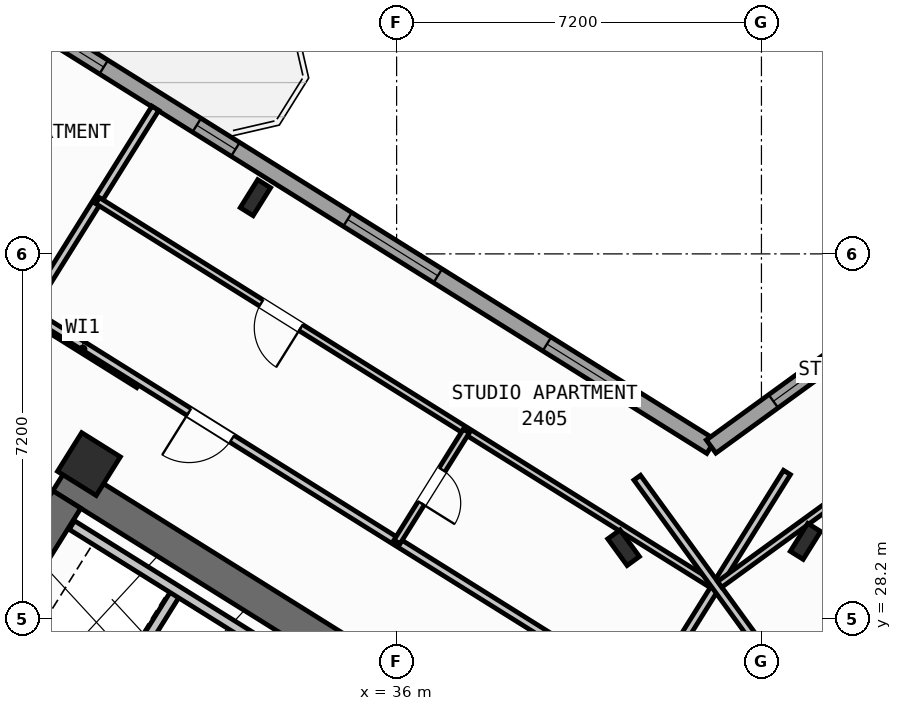
"""IFC4 building model, lengths in metres.
Left out: names, types, materials, properties, quantities, classifications, styles, units other than length and angle.
Written with IfcOpenShell. Run it as: python <this file> out.ifc"""

import sys

from ifc_helpers import new_model, si_unit, direction, frame, frame_2d, origin, origin_2d, place, context, subcontext, project, spatial, rectangle, hollow_rectangle, i_section, extrude, source, transform, mapped, element, fill, save


model = new_model("IFC4")
c1 = context("Model", 3, precision=1e-05, world=origin(), true_north=direction((0.0, 1.0)))
c2 = subcontext(c1, "Body", "Model", "MODEL_VIEW")
j1 = project(units=[si_unit("LENGTHUNIT", "METRE"), si_unit("PLANEANGLEUNIT", "RADIAN")], contexts=[c1])
p1 = place(None, origin())
s1 = spatial("IfcSite", under=j1, at=p1, CompositionType="ELEMENT")
p2 = place(p1, origin())
s2 = spatial("IfcBuilding", under=s1, at=p2, CompositionType="ELEMENT")
p3 = place(p2, frame((0.0, 0.0, 97.2)))
s3 = spatial("IfcBuildingStorey", under=s2, at=p3, CompositionType="ELEMENT", Elevation=97.2)
p4 = place(p3, frame((40.615, 23.983, 0.0), z_axis=(0.0, 0.0, 1.0), x_axis=(-0.848045953968, 0.529922692436, 0.0)))
e1 = element("IfcWall", 1, at=p4, inside=s3, PredefinedType="SHEAR", context=c2, shape_type="SweptSolid", body=[
    extrude(rectangle(XDim=13.24, YDim=0.65, at=frame_2d((6.62, 0.0))), origin(), (0.0, 0.0, 1.0), 3.32),
])
p5 = place(p3, frame((29.491, 30.552, 0.0), z_axis=(0.0, 0.0, 1.0), x_axis=(-0.529893103397, -0.8480644427, 0.0)))
e2 = element("IfcWall", 2, at=p5, inside=s3, PredefinedType="SHEAR", context=c2, shape_type="SweptSolid", body=[
    extrude(rectangle(XDim=3.525, YDim=0.65, at=frame_2d((1.763, 0.0))), origin(), (0.0, 0.0, 1.0), 3.32),
])
p6 = place(p3, frame((44.325, 24.113, 0.0), z_axis=(0.0, 0.0, 1.0), x_axis=(0.809012664862, 0.58779121131, 0.0)))
e3 = element("IfcWall", 3, at=p6, inside=s3, PredefinedType="SHEAR", context=c2, shape_type="SweptSolid", body=[
    extrude(rectangle(XDim=12.44, YDim=0.65, at=frame_2d((6.22, 0.0))), origin(), (0.0, 0.0, 1.0), 3.32),
])
m1 = source(origin(), c2, "Body", "SweptSolid", [
    extrude(i_section(OverallWidth=0.3, OverallDepth=0.65, WebThickness=0.016, FlangeThickness=0.031, at=origin_2d()), origin(), (0.0, 0.0, 1.0), 3.6),
])
for number, where, z_axis, x_axis in (
    (4, (44.068, 29.726, 0.0), (0.0, 0.0, 1.0), (-0.848, 0.53, 0.0)),
    (5, (33.213, 36.509, 0.0), (0.0, 0.0, 1.0), (-0.848, 0.53, 0.0)),
):
    element("IfcColumn", number, at=place(p3, frame(where, z_axis=z_axis, x_axis=x_axis)), inside=s3, PredefinedType="COLUMN", context=c2, shape_type="MappedRepresentation", body=[
        mapped(m1, transform((0.0, 0.0, 0.0), scale=1.0)),
    ])
m2 = source(origin(), c2, "Body", "SweptSolid", [
    extrude(hollow_rectangle(XDim=0.9, YDim=0.9, WallThickness=0.036, at=origin_2d()), origin(), (0.0, 0.0, 1.0), 3.6),
])
p7 = place(p3, frame((29.928, 31.251, 0.0), z_axis=(0.0, 0.0, 1.0), x_axis=(-0.848048096156, 0.529919264233, 0.0)))
e6 = element("IfcColumn", 6, at=p7, inside=s3, PredefinedType="COLUMN", context=c2, shape_type="MappedRepresentation", body=[
    mapped(m2, transform((0.0, 0.0, 0.0), scale=1.0)),
])
p8 = place(p3, frame((40.479, 29.601, 0.0), z_axis=(0.0, 0.0, 1.0), x_axis=(0.809016994375, 0.587785252292, 0.0)))
e7 = element("IfcColumn", 7, at=p8, inside=s3, PredefinedType="COLUMN", context=c2, shape_type="MappedRepresentation", body=[
    mapped(m1, transform((0.0, 0.0, 0.0), scale=1.0)),
])
p9 = place(p3, frame((31.76, 12.183, 0.0), z_axis=(0.0, 0.0, 1.0), x_axis=(-0.848047074256, 0.529920899612, 0.0)))
e8 = element("IfcWall", 8, at=p9, inside=s3, PredefinedType="STANDARD", context=c2, shape_type="SweptSolid", body=[
    extrude(rectangle(XDim=30.652, YDim=0.32, at=frame_2d((15.326, 0.0))), origin(), (0.0, 0.0, 1.0), 3.32),
])
p10 = place(p9, frame((15.153, 0.0, 0.0)))
e9 = element("IfcOpeningElement", 9, at=p10, cuts=e8, PredefinedType="OPENING", context=c2, shape_type="SweptSolid", body=[
    extrude(rectangle(XDim=1.2, YDim=2.15, at=frame_2d((0.6, 1.075))), frame((0.0, 0.17, 0.0), z_axis=(0.0, -1.0, 0.0), x_axis=(1.0, 0.0, 0.0)), (0.0, 0.0, 1.0), 0.34),
])
p11 = place(p9, frame((2.002, 0.0, 0.8)))
e10 = element("IfcOpeningElement", 10, at=p11, cuts=e8, PredefinedType="OPENING", context=c2, shape_type="SweptSolid", body=[
    extrude(rectangle(XDim=2.1, YDim=1.55, at=frame_2d((1.05, 0.775))), frame((0.0, 0.17, 0.0), z_axis=(0.0, -1.0, 0.0), x_axis=(1.0, 0.0, 0.0)), (0.0, 0.0, 1.0), 0.34),
])
p12 = place(p9, frame((7.206, 0.0, 0.8)))
e11 = element("IfcOpeningElement", 11, at=p12, cuts=e8, PredefinedType="OPENING", context=c2, shape_type="SweptSolid", body=[
    extrude(rectangle(XDim=2.1, YDim=1.55, at=frame_2d((1.05, 0.775))), frame((0.0, 0.17, 0.0), z_axis=(0.0, -1.0, 0.0), x_axis=(1.0, 0.0, 0.0)), (0.0, 0.0, 1.0), 0.34),
])
p13 = place(p9, frame((12.648, 0.0, 1.0)))
e12 = element("IfcOpeningElement", 12, at=p13, cuts=e8, PredefinedType="OPENING", context=c2, shape_type="SweptSolid", body=[
    extrude(rectangle(XDim=0.9, YDim=1.25, at=frame_2d((0.45, 0.625))), frame((0.0, 0.17, 0.0), z_axis=(0.0, -1.0, 0.0), x_axis=(1.0, 0.0, 0.0)), (0.0, 0.0, 1.0), 0.34),
])
p14 = place(p9, frame((27.974, 0.0, 0.95)))
e13 = element("IfcOpeningElement", 13, at=p14, cuts=e8, PredefinedType="OPENING", context=c2, shape_type="SweptSolid", body=[
    extrude(rectangle(XDim=1.2, YDim=1.4, at=frame_2d((0.6, 0.7))), frame((0.0, 0.17, 0.0), z_axis=(0.0, -1.0, 0.0), x_axis=(1.0, 0.0, 0.0)), (0.0, 0.0, 1.0), 0.34),
])
p15 = place(p9, frame((18.347, 0.0, 1.0)))
e14 = element("IfcOpeningElement", 14, at=p15, cuts=e8, PredefinedType="OPENING", context=c2, shape_type="SweptSolid", body=[
    extrude(rectangle(XDim=0.9, YDim=1.25, at=frame_2d((0.45, 0.625))), frame((0.0, 0.17, 0.0), z_axis=(0.0, -1.0, 0.0), x_axis=(1.0, 0.0, 0.0)), (0.0, 0.0, 1.0), 0.34),
])
p16 = place(p9, frame((20.931, 0.0, 1.0)))
e15 = element("IfcOpeningElement", 15, at=p16, cuts=e8, PredefinedType="OPENING", context=c2, shape_type="SweptSolid", body=[
    extrude(rectangle(XDim=0.65, YDim=1.15, at=frame_2d((0.325, 0.575))), frame((0.0, 0.17, 0.0), z_axis=(0.0, -1.0, 0.0), x_axis=(1.0, 0.0, 0.0)), (0.0, 0.0, 1.0), 0.34),
])
p17 = place(p9, frame((22.938, 0.0, 1.0)))
e16 = element("IfcOpeningElement", 16, at=p17, cuts=e8, PredefinedType="OPENING", context=c2, shape_type="SweptSolid", body=[
    extrude(rectangle(XDim=0.9, YDim=1.25, at=frame_2d((0.45, 0.625))), frame((0.0, 0.17, 0.0), z_axis=(0.0, -1.0, 0.0), x_axis=(1.0, 0.0, 0.0)), (0.0, 0.0, 1.0), 0.34),
])
p18 = place(p9, frame((25.069, 0.0, 1.0)))
e17 = element("IfcOpeningElement", 17, at=p18, cuts=e8, PredefinedType="OPENING", context=c2, shape_type="SweptSolid", body=[
    extrude(rectangle(XDim=0.9, YDim=1.25, at=frame_2d((0.45, 0.625))), frame((0.0, 0.17, 0.0), z_axis=(0.0, -1.0, 0.0), x_axis=(1.0, 0.0, 0.0)), (0.0, 0.0, 1.0), 0.34),
])
p19 = place(p3, frame((17.424, 47.083, 0.0), z_axis=(0.0, 0.0, 1.0), x_axis=(0.848049927979, -0.529916332693, 0.0)))
e18 = element("IfcWall", 18, at=p19, inside=s3, PredefinedType="STANDARD", context=c2, shape_type="SweptSolid", body=[
    extrude(rectangle(XDim=29.223, YDim=0.32, at=frame_2d((14.612, 0.0))), origin(), (0.0, 0.0, 1.0), 3.32),
])
p20 = place(p19, frame((3.745, 0.0, 0.0)))
e19 = element("IfcOpeningElement", 19, at=p20, cuts=e18, PredefinedType="OPENING", context=c2, shape_type="SweptSolid", body=[
    extrude(rectangle(XDim=1.05, YDim=2.15, at=frame_2d((0.525, 1.075))), frame((0.0, 0.17, 0.0), z_axis=(0.0, -1.0, 0.0), x_axis=(1.0, 0.0, 0.0)), (0.0, 0.0, 1.0), 0.34),
])
p21 = place(p19, frame((0.699, 0.0, 0.95)))
e20 = element("IfcOpeningElement", 20, at=p21, cuts=e18, PredefinedType="OPENING", context=c2, shape_type="SweptSolid", body=[
    extrude(rectangle(XDim=1.2, YDim=1.4, at=frame_2d((0.6, 0.7))), frame((0.0, 0.17, 0.0), z_axis=(0.0, -1.0, 0.0), x_axis=(1.0, 0.0, 0.0)), (0.0, 0.0, 1.0), 0.34),
])
p22 = place(p19, frame((6.951, 0.0, 1.0)))
e21 = element("IfcOpeningElement", 21, at=p22, cuts=e18, PredefinedType="OPENING", context=c2, shape_type="SweptSolid", body=[
    extrude(rectangle(XDim=0.9, YDim=1.25, at=frame_2d((0.45, 0.625))), frame((0.0, 0.17, 0.0), z_axis=(0.0, -1.0, 0.0), x_axis=(1.0, 0.0, 0.0)), (0.0, 0.0, 1.0), 0.34),
])
p23 = place(p19, frame((9.841, 0.0, 0.85)))
e22 = element("IfcOpeningElement", 22, at=p23, cuts=e18, PredefinedType="OPENING", context=c2, shape_type="SweptSolid", body=[
    extrude(rectangle(XDim=1.5, YDim=1.5, at=frame_2d((0.75, 0.75))), frame((0.0, 0.17, 0.0), z_axis=(0.0, -1.0, 0.0), x_axis=(1.0, 0.0, 0.0)), (0.0, 0.0, 1.0), 0.34),
])
p24 = place(p19, frame((13.889, 0.0, 0.95)))
e23 = element("IfcOpeningElement", 23, at=p24, cuts=e18, PredefinedType="OPENING", context=c2, shape_type="SweptSolid", body=[
    extrude(rectangle(XDim=1.2, YDim=1.4, at=frame_2d((0.6, 0.7))), frame((0.0, 0.17, 0.0), z_axis=(0.0, -1.0, 0.0), x_axis=(1.0, 0.0, 0.0)), (0.0, 0.0, 1.0), 0.34),
])
p25 = place(p19, frame((17.254, 0.0, 1.0)))
e24 = element("IfcOpeningElement", 24, at=p25, cuts=e18, PredefinedType="OPENING", context=c2, shape_type="SweptSolid", body=[
    extrude(rectangle(XDim=0.9, YDim=1.25, at=frame_2d((0.45, 0.625))), frame((0.0, 0.17, 0.0), z_axis=(0.0, -1.0, 0.0), x_axis=(1.0, 0.0, 0.0)), (0.0, 0.0, 1.0), 0.34),
])
p26 = place(p19, frame((20.764, 0.0, 0.8)))
e25 = element("IfcOpeningElement", 25, at=p26, cuts=e18, PredefinedType="OPENING", context=c2, shape_type="SweptSolid", body=[
    extrude(rectangle(XDim=2.1, YDim=1.55, at=frame_2d((1.05, 0.775))), frame((0.0, 0.17, 0.0), z_axis=(0.0, -1.0, 0.0), x_axis=(1.0, 0.0, 0.0)), (0.0, 0.0, 1.0), 0.34),
])
p27 = place(p19, frame((25.403, 0.0, 0.8)))
e26 = element("IfcOpeningElement", 26, at=p27, cuts=e18, PredefinedType="OPENING", context=c2, shape_type="SweptSolid", body=[
    extrude(rectangle(XDim=2.1, YDim=1.55, at=frame_2d((1.05, 0.775))), frame((0.0, 0.17, 0.0), z_axis=(0.0, -1.0, 0.0), x_axis=(1.0, 0.0, 0.0)), (0.0, 0.0, 1.0), 0.34),
])
p28 = place(p3, frame((42.207, 31.597, 0.0), z_axis=(0.0, 0.0, 1.0), x_axis=(0.809020333377, 0.587780656523, 0.0)))
e27 = element("IfcWall", 27, at=p28, inside=s3, PredefinedType="STANDARD", context=c2, shape_type="SweptSolid", body=[
    extrude(rectangle(XDim=15.223, YDim=0.32, at=frame_2d((7.611, 0.0))), origin(), (0.0, 0.0, 1.0), 3.32),
])
p29 = place(p28, frame((12.82, 0.0, 0.0)))
e28 = element("IfcOpeningElement", 28, at=p29, cuts=e27, PredefinedType="OPENING", context=c2, shape_type="SweptSolid", body=[
    extrude(rectangle(XDim=1.05, YDim=2.15, at=frame_2d((0.525, 1.075))), frame((0.0, 0.17, 0.0), z_axis=(0.0, -1.0, 0.0), x_axis=(1.0, 0.0, 0.0)), (0.0, 0.0, 1.0), 0.34),
])
p30 = place(p28, frame((1.52, 0.0, 0.8)))
e29 = element("IfcOpeningElement", 29, at=p30, cuts=e27, PredefinedType="OPENING", context=c2, shape_type="SweptSolid", body=[
    extrude(rectangle(XDim=2.1, YDim=1.55, at=frame_2d((1.05, 0.775))), frame((0.0, 0.17, 0.0), z_axis=(0.0, -1.0, 0.0), x_axis=(1.0, 0.0, 0.0)), (0.0, 0.0, 1.0), 0.34),
])
p31 = place(p28, frame((5.76, 0.0, 0.8)))
e30 = element("IfcOpeningElement", 30, at=p31, cuts=e27, PredefinedType="OPENING", context=c2, shape_type="SweptSolid", body=[
    extrude(rectangle(XDim=2.1, YDim=1.55, at=frame_2d((1.05, 0.775))), frame((0.0, 0.17, 0.0), z_axis=(0.0, -1.0, 0.0), x_axis=(1.0, 0.0, 0.0)), (0.0, 0.0, 1.0), 0.34),
])
p32 = place(p28, frame((10.219, 0.0, 1.0)))
e31 = element("IfcOpeningElement", 31, at=p32, cuts=e27, PredefinedType="OPENING", context=c2, shape_type="SweptSolid", body=[
    extrude(rectangle(XDim=0.9, YDim=1.25, at=frame_2d((0.45, 0.625))), frame((0.0, 0.17, 0.0), z_axis=(0.0, -1.0, 0.0), x_axis=(1.0, 0.0, 0.0)), (0.0, 0.0, 1.0), 0.34),
])
p33 = place(p3, frame((31.645, 28.716, 0.0), z_axis=(0.0, 0.0, 1.0), x_axis=(-0.52986693015, -0.848080795876, 0.0)))
e32 = element("IfcWall", 32, at=p33, inside=s3, PredefinedType="STANDARD", context=c2, shape_type="SweptSolid", body=[
    extrude(rectangle(XDim=2.66, YDim=0.2, at=frame_2d((1.33, 0.0))), origin(), (0.0, 0.0, 1.0), 3.31),
])
p34 = place(p3, frame((33.363, 27.69, 0.0), z_axis=(0.0, 0.0, 1.0), x_axis=(-0.848053806312, 0.529910125964, 0.0)))
e33 = element("IfcWall", 33, at=p34, inside=s3, PredefinedType="STANDARD", context=c2, shape_type="SweptSolid", body=[
    extrude(rectangle(XDim=4.448, YDim=0.2, at=frame_2d((2.224, 0.0))), origin(), (0.0, 0.0, 1.0), 3.31),
])
p35 = place(p3, frame((30.914, 32.829, 0.0), z_axis=(0.0, 0.0, 1.0), x_axis=(-0.848008813643, 0.529982124211, 0.0)))
e34 = element("IfcWall", 34, at=p35, inside=s3, PredefinedType="PARTITIONING", context=c2, shape_type="SweptSolid", body=[
    extrude(rectangle(XDim=2.61, YDim=0.16, at=frame_2d((1.305, 0.0))), origin(), (0.0, 0.0, 1.0), 3.31),
])
p36 = place(p3, frame((31.239, 38.274, 0.0), z_axis=(0.0, 0.0, 1.0), x_axis=(-0.529928058306, -0.848042600947, 0.0)))
e35 = element("IfcWall", 35, at=p36, inside=s3, PredefinedType="PARTITIONING", context=c2, shape_type="SweptSolid", body=[
    extrude(rectangle(XDim=8.05, YDim=0.16, at=frame_2d((4.025, 0.0))), origin(), (0.0, 0.0, 1.0), 3.31),
])
p37 = place(p3, frame((41.936, 26.012, 0.0), z_axis=(0.0, 0.0, 1.0), x_axis=(-0.848051154596, 0.529914369676, 0.0)))
e36 = element("IfcWall", 36, at=p37, inside=s3, PredefinedType="PARTITIONING", context=c2, shape_type="SweptSolid", body=[
    extrude(rectangle(XDim=15.57, YDim=0.16, at=frame_2d((7.785, 0.0))), origin(), (0.0, 0.0, 1.0), 3.31),
])
p38 = place(p37, frame((10.83, 0.0, 0.0)))
e37 = element("IfcOpeningElement", 37, at=p38, cuts=e36, PredefinedType="OPENING", context=c2, shape_type="SweptSolid", body=[
    extrude(rectangle(XDim=1.0, YDim=2.1, at=frame_2d((0.5, 1.05))), frame((0.0, 0.09, 0.0), z_axis=(0.0, -1.0, 0.0), x_axis=(1.0, 0.0, 0.0)), (0.0, 0.0, 1.0), 0.18),
])
p39 = place(p3, frame((43.704, 31.086, 0.0), z_axis=(0.0, 0.0, 1.0), x_axis=(-0.529906828443, -0.848055866774, 0.0)))
e38 = element("IfcWall", 38, at=p39, inside=s3, PredefinedType="PARTITIONING", context=c2, shape_type="SweptSolid", body=[
    extrude(rectangle(XDim=5.48, YDim=0.16, at=frame_2d((2.74, 0.0))), origin(), (0.0, 0.0, 1.0), 3.31),
])
p40 = place(p3, frame((42.226, 28.873, 0.0), z_axis=(0.0, 0.0, 1.0), x_axis=(-0.848049134363, 0.529917602752, 0.0)))
e39 = element("IfcWall", 39, at=p40, inside=s3, PredefinedType="PLUMBINGWALL", context=c2, shape_type="SweptSolid", body=[
    extrude(rectangle(XDim=14.3, YDim=0.14, at=frame_2d((7.15, 0.0))), origin(), (0.0, 0.0, 1.0), 3.31),
])
p41 = place(p40, frame((9.57, 0.0, 0.0)))
e40 = element("IfcOpeningElement", 40, at=p41, cuts=e39, PredefinedType="OPENING", context=c2, shape_type="SweptSolid", body=[
    extrude(rectangle(XDim=0.92, YDim=2.08, at=frame_2d((0.46, 1.04))), frame((0.0, 0.08, 0.0), z_axis=(0.0, -1.0, 0.0), x_axis=(1.0, 0.0, 0.0)), (0.0, 0.0, 1.0), 0.16),
])
p42 = place(p3, frame((37.375, 31.904, 0.0), z_axis=(0.0, 0.0, 1.0), x_axis=(-0.529913878929, -0.848051461244, 0.0)))
e41 = element("IfcWall", 41, at=p42, inside=s3, PredefinedType="PLUMBINGWALL", context=c2, shape_type="SweptSolid", body=[
    extrude(rectangle(XDim=2.58, YDim=0.14, at=frame_2d((1.29, 0.0))), origin(), (0.0, 0.0, 1.0), 3.31),
])
p43 = place(p42, frame((0.9, 0.0, 0.0)))
e42 = element("IfcOpeningElement", 42, at=p43, cuts=e41, PredefinedType="OPENING", context=c2, shape_type="SweptSolid", body=[
    extrude(rectangle(XDim=0.78, YDim=2.05, at=frame_2d((0.39, 1.025))), frame((0.0, 0.08, 0.0), z_axis=(0.0, -1.0, 0.0), x_axis=(1.0, 0.0, 0.0)), (0.0, 0.0, 1.0), 0.16),
])
p44 = place(p3, frame((42.866, 26.044, 0.0), z_axis=(0.0, 0.0, 1.0), x_axis=(0.809020254154, 0.587780765566, 0.0)))
e43 = element("IfcWall", 43, at=p44, inside=s3, PredefinedType="PARTITIONING", context=c2, shape_type="SweptSolid", body=[
    extrude(rectangle(XDim=14.67, YDim=0.16, at=frame_2d((7.335, 0.0))), origin(), (0.0, 0.0, 1.0), 3.31),
])
p45 = place(p44, frame((10.2, 0.0, 0.0)))
e44 = element("IfcOpeningElement", 44, at=p45, cuts=e43, PredefinedType="OPENING", context=c2, shape_type="SweptSolid", body=[
    extrude(rectangle(XDim=1.0, YDim=2.1, at=frame_2d((0.5, 1.05))), frame((0.0, 0.09, 0.0), z_axis=(0.0, -1.0, 0.0), x_axis=(1.0, 0.0, 0.0)), (0.0, 0.0, 1.0), 0.18),
])
p46 = place(p3, frame((43.969, 26.55, 0.0), z_axis=(0.0, 0.0, 1.0), x_axis=(-0.587776919386, 0.80902304852, 0.0)))
e45 = element("IfcWall", 45, at=p46, inside=s3, PredefinedType="PARTITIONING", context=c2, shape_type="SweptSolid", body=[
    extrude(rectangle(XDim=5.48, YDim=0.16, at=frame_2d((2.74, 0.0))), origin(), (0.0, 0.0, 1.0), 3.31),
])
p47 = place(p3, frame((42.377, 28.878, 0.0), z_axis=(0.0, 0.0, 1.0), x_axis=(0.809020411523, 0.587780548963, 0.0)))
e46 = element("IfcWall", 46, at=p47, inside=s3, PredefinedType="PLUMBINGWALL", context=c2, shape_type="SweptSolid", body=[
    extrude(rectangle(XDim=13.4, YDim=0.14, at=frame_2d((6.7, 0.0))), origin(), (0.0, 0.0, 1.0), 3.31),
])
p48 = place(p47, frame((8.94, 0.0, 0.0)))
e47 = element("IfcOpeningElement", 47, at=p48, cuts=e46, PredefinedType="OPENING", context=c2, shape_type="SweptSolid", body=[
    extrude(rectangle(XDim=0.92, YDim=2.08, at=frame_2d((0.46, 1.04))), frame((0.0, 0.08, 0.0), z_axis=(0.0, -1.0, 0.0), x_axis=(1.0, 0.0, 0.0)), (0.0, 0.0, 1.0), 0.16),
])
m3 = source(origin(), c2, "Body", "SweptSolid", [
    extrude(rectangle(XDim=1.2, YDim=1.4, at=frame_2d((0.6, 0.7))), frame((0.0, 0.03, 0.0), z_axis=(0.0, -1.0, 0.0), x_axis=(1.0, 0.0, 0.0)), (0.0, 0.0, 1.0), 0.06),
])
p49 = place(p24, origin())
e48 = element("IfcWindow", 48, at=p49, inside=s3, PartitioningType="SINGLE_PANEL", PredefinedType="WINDOW", context=c2, shape_type="MappedRepresentation", body=[
    mapped(m3, transform((0.0, 0.0, 0.0), scale=1.0)),
])
fill(e23, e48)
m4 = source(origin(), c2, "Body", "SweptSolid", [
    extrude(rectangle(XDim=0.9, YDim=1.25, at=frame_2d((0.45, 0.625))), frame((0.0, 0.03, 0.0), z_axis=(0.0, -1.0, 0.0), x_axis=(1.0, 0.0, 0.0)), (0.0, 0.0, 1.0), 0.06),
])
p50 = place(p25, origin())
e49 = element("IfcWindow", 49, at=p50, inside=s3, PartitioningType="SINGLE_PANEL", PredefinedType="WINDOW", context=c2, shape_type="MappedRepresentation", body=[
    mapped(m4, transform((0.0, 0.0, 0.0), scale=1.0)),
])
fill(e24, e49)
m5 = source(origin(), c2, "Body", "SweptSolid", [
    extrude(rectangle(XDim=2.1, YDim=1.55, at=frame_2d((1.05, 0.775))), frame((0.0, 0.03, 0.0), z_axis=(0.0, -1.0, 0.0), x_axis=(1.0, 0.0, 0.0)), (0.0, 0.0, 1.0), 0.06),
])
p51 = place(p26, origin())
e50 = element("IfcWindow", 50, at=p51, inside=s3, PartitioningType="SINGLE_PANEL", PredefinedType="WINDOW", context=c2, shape_type="MappedRepresentation", body=[
    mapped(m5, transform((0.0, 0.0, 0.0), scale=1.0)),
])
fill(e25, e50)
p52 = place(p27, origin())
e51 = element("IfcWindow", 51, at=p52, inside=s3, PartitioningType="SINGLE_PANEL", PredefinedType="WINDOW", context=c2, shape_type="MappedRepresentation", body=[
    mapped(m5, transform((0.0, 0.0, 0.0), scale=1.0)),
])
fill(e26, e51)
p53 = place(p30, origin())
e52 = element("IfcWindow", 52, at=p53, inside=s3, PartitioningType="SINGLE_PANEL", PredefinedType="WINDOW", context=c2, shape_type="MappedRepresentation", body=[
    mapped(m5, transform((0.0, 0.0, 0.0), scale=1.0)),
])
fill(e29, e52)
m6 = source(origin(), c2, "Body", "SweptSolid", [
    extrude(rectangle(XDim=1.0, YDim=2.1, at=frame_2d((0.5, 1.05))), frame((0.0, 0.025, 0.0), z_axis=(0.0, -1.0, 0.0), x_axis=(1.0, 0.0, 0.0)), (0.0, 0.0, 1.0), 0.05),
])
p54 = place(p38, origin())
e53 = element("IfcDoor", 53, at=p54, inside=s3, OperationType="SINGLE_SWING_RIGHT", PredefinedType="DOOR", context=c2, shape_type="MappedRepresentation", body=[
    mapped(m6, transform((0.0, 0.0, 0.0), scale=1.0)),
])
fill(e37, e53)
m7 = source(origin(), c2, "Body", "SweptSolid", [
    extrude(rectangle(XDim=0.92, YDim=2.08, at=frame_2d((0.46, 1.04))), frame((0.0, 0.025, 0.0), z_axis=(0.0, -1.0, 0.0), x_axis=(1.0, 0.0, 0.0)), (0.0, 0.0, 1.0), 0.05),
])
p55 = place(p41, origin())
e54 = element("IfcDoor", 54, at=p55, inside=s3, OperationType="SINGLE_SWING_LEFT", PredefinedType="DOOR", context=c2, shape_type="MappedRepresentation", body=[
    mapped(m7, transform((0.0, 0.0, 0.0), scale=1.0)),
])
fill(e40, e54)
m8 = source(origin(), c2, "Body", "SweptSolid", [
    extrude(rectangle(XDim=0.78, YDim=2.05, at=frame_2d((0.39, 1.025))), frame((0.0, 0.025, 0.0), z_axis=(0.0, -1.0, 0.0), x_axis=(1.0, 0.0, 0.0)), (0.0, 0.0, 1.0), 0.05),
])
p56 = place(p43, origin())
e55 = element("IfcDoor", 55, at=p56, inside=s3, OperationType="SINGLE_SWING_RIGHT", PredefinedType="DOOR", context=c2, shape_type="MappedRepresentation", body=[
    mapped(m8, transform((0.0, 0.0, 0.0), scale=1.0)),
])
fill(e42, e55)
save(model, sys.argv[1])
